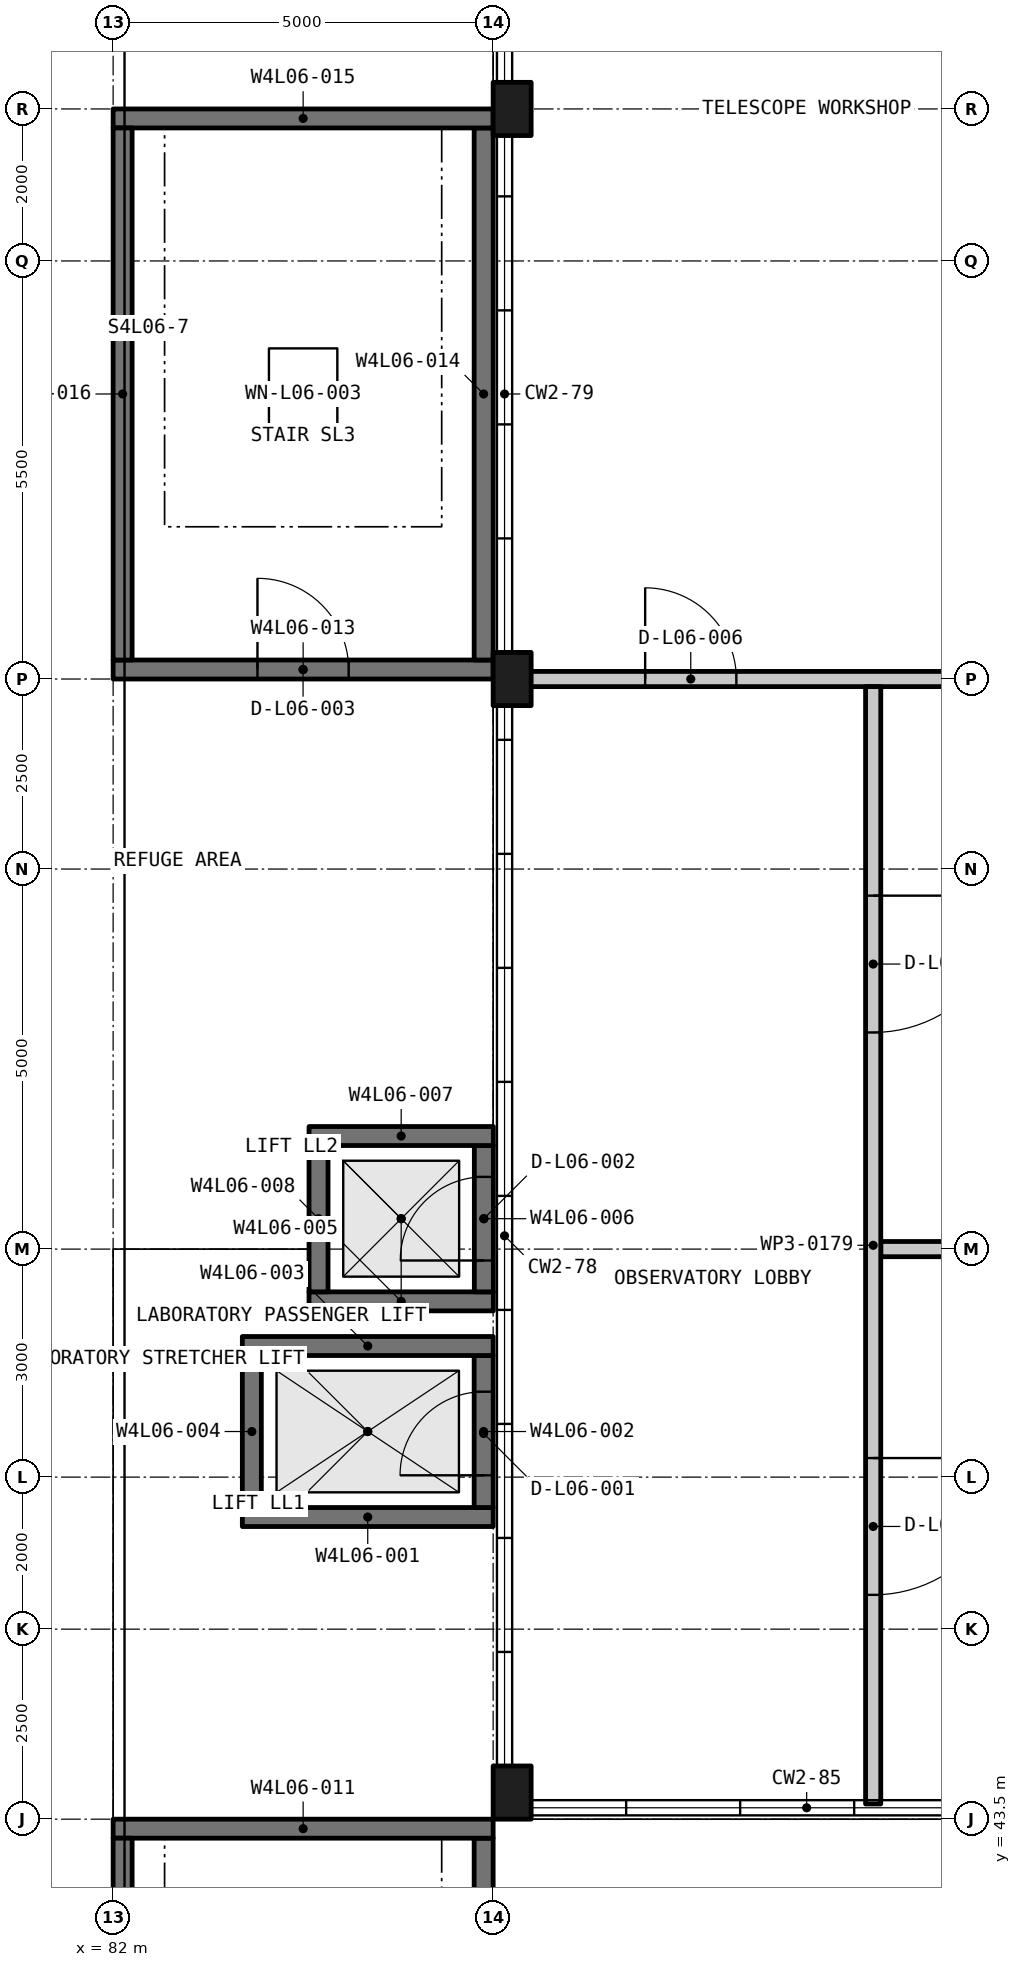
"""IFC4 building model, lengths in metres.
Left out: names, types, materials, properties, quantities, classifications, styles, units other than length and angle.
Written with IfcOpenShell. Run it as: python <this file> out.ifc"""

import sys

from ifc_helpers import new_model, si_unit, direction, frame, frame_2d, origin, origin_2d, place, context, subcontext, project, spatial, rectangle, extrude, element, fill, save


model = new_model("IFC4")
c1 = context("Model", 3, precision=1e-05, world=origin(), true_north=direction((0.0, 1.0)))
c2 = subcontext(c1, "Body", "Model", "MODEL_VIEW")
j1 = project(units=[si_unit("LENGTHUNIT", "METRE"), si_unit("PLANEANGLEUNIT", "RADIAN")], contexts=[c1])
p1 = place(None, origin())
s1 = spatial("IfcSite", under=j1, at=p1, CompositionType="ELEMENT")
p2 = place(p1, origin())
s2 = spatial("IfcBuilding", under=s1, at=p2, CompositionType="ELEMENT")
p3 = place(p2, frame((0.0, 0.0, 29.25)))
s3 = spatial("IfcBuildingStorey", under=s2, at=p3, CompositionType="ELEMENT", Elevation=29.25)
for number, where, z_axis, x_axis in (
    (1, (87.25, 43.85, -0.3), (0.0, 0.0, 1.0), (1.0, 0.0, 0.0)),
    (2, (87.25, 58.5, -0.3), (0.0, 0.0, 1.0), (1.0, 0.0, 0.0)),
    (3, (87.25, 66.0, -0.3), (0.0, 0.0, 1.0), (1.0, 0.0, 0.0)),
):
    element("IfcColumn", number, at=place(p3, frame(where, z_axis=z_axis, x_axis=x_axis)), inside=s3, PredefinedType="COLUMN", context=c2, shape_type="SweptSolid", body=[
        extrude(rectangle(XDim=0.5, YDim=0.7, at=origin_2d()), origin(), (0.0, 0.0, 1.0), 4.5),
    ])
p4 = place(p3, frame((83.7, 47.475, -0.3), z_axis=(0.0, 0.0, 1.0), x_axis=(1.0, 0.0, 0.0)))
e4 = element("IfcWall", 4, at=p4, inside=s3, PredefinedType="SHEAR", context=c2, shape_type="SweptSolid", body=[
    extrude(rectangle(XDim=3.3, YDim=0.25, at=frame_2d((1.65, 0.0))), origin(), (0.0, 0.0, 1.0), 3.65),
])
p5 = place(p3, frame((86.875, 47.6, -0.3), z_axis=(0.0, 0.0, 1.0), x_axis=(0.0, 1.0, 0.0)))
e5 = element("IfcWall", 5, at=p5, inside=s3, PredefinedType="SHEAR", context=c2, shape_type="SweptSolid", body=[
    extrude(rectangle(XDim=2.0, YDim=0.25, at=frame_2d((1.0, 0.0))), origin(), (0.0, 0.0, 1.0), 3.65),
])
p6 = place(p5, frame((0.424, 0.0, 0.3)))
e6 = element("IfcOpeningElement", 6, at=p6, cuts=e5, PredefinedType="OPENING", context=c2, shape_type="SweptSolid", body=[
    extrude(rectangle(XDim=1.1, YDim=2.1, at=frame_2d((0.55, 1.05))), frame((0.0, 0.135, 0.0), z_axis=(0.0, -1.0, 0.0), x_axis=(1.0, 0.0, 0.0)), (0.0, 0.0, 1.0), 0.27),
])
p7 = place(p3, frame((83.7, 49.725, -0.3), z_axis=(0.0, 0.0, 1.0), x_axis=(1.0, 0.0, 0.0)))
e7 = element("IfcWall", 7, at=p7, inside=s3, PredefinedType="SHEAR", context=c2, shape_type="SweptSolid", body=[
    extrude(rectangle(XDim=3.3, YDim=0.25, at=frame_2d((1.65, 0.0))), origin(), (0.0, 0.0, 1.0), 3.65),
])
p8 = place(p3, frame((83.825, 47.6, -0.3), z_axis=(0.0, 0.0, 1.0), x_axis=(0.0, 1.0, 0.0)))
e8 = element("IfcWall", 8, at=p8, inside=s3, PredefinedType="SHEAR", context=c2, shape_type="SweptSolid", body=[
    extrude(rectangle(XDim=2.0, YDim=0.25, at=frame_2d((1.0, 0.0))), origin(), (0.0, 0.0, 1.0), 3.65),
])
p9 = place(p3, frame((84.577, 50.312, -0.3), z_axis=(0.0, 0.0, 1.0), x_axis=(1.0, 0.0, 0.0)))
e9 = element("IfcWall", 9, at=p9, inside=s3, PredefinedType="SHEAR", context=c2, shape_type="SweptSolid", body=[
    extrude(rectangle(XDim=2.425, YDim=0.25, at=frame_2d((1.212, 0.0))), origin(), (0.0, 0.0, 1.0), 4.05),
])
p10 = place(p3, frame((86.877, 50.438, -0.3), z_axis=(0.0, 0.0, 1.0), x_axis=(0.0, 1.0, 0.0)))
e10 = element("IfcWall", 10, at=p10, inside=s3, PredefinedType="SHEAR", context=c2, shape_type="SweptSolid", body=[
    extrude(rectangle(XDim=1.925, YDim=0.25, at=frame_2d((0.962, 0.0))), origin(), (0.0, 0.0, 1.0), 4.05),
])
p11 = place(p10, frame((0.413, 0.0, 0.3)))
e11 = element("IfcOpeningElement", 11, at=p11, cuts=e10, PredefinedType="OPENING", context=c2, shape_type="SweptSolid", body=[
    extrude(rectangle(XDim=1.1, YDim=2.1, at=frame_2d((0.55, 1.05))), frame((0.0, 0.135, 0.0), z_axis=(0.0, -1.0, 0.0), x_axis=(1.0, 0.0, 0.0)), (0.0, 0.0, 1.0), 0.27),
])
p12 = place(p3, frame((84.577, 52.488, -0.3), z_axis=(0.0, 0.0, 1.0), x_axis=(1.0, 0.0, 0.0)))
e12 = element("IfcWall", 12, at=p12, inside=s3, PredefinedType="SHEAR", context=c2, shape_type="SweptSolid", body=[
    extrude(rectangle(XDim=2.425, YDim=0.25, at=frame_2d((1.212, 0.0))), origin(), (0.0, 0.0, 1.0), 4.05),
])
p13 = place(p3, frame((84.702, 50.438, -0.3), z_axis=(0.0, 0.0, 1.0), x_axis=(0.0, 1.0, 0.0)))
e13 = element("IfcWall", 13, at=p13, inside=s3, PredefinedType="SHEAR", context=c2, shape_type="SweptSolid", body=[
    extrude(rectangle(XDim=1.925, YDim=0.25, at=frame_2d((0.962, 0.0))), origin(), (0.0, 0.0, 1.0), 4.05),
])
p14 = place(p3, frame((86.875, 36.25, -0.3), z_axis=(0.0, 0.0, 1.0), x_axis=(0.0, 1.0, 0.0)))
e14 = element("IfcWall", 14, at=p14, inside=s3, PredefinedType="SHEAR", context=c2, shape_type="SweptSolid", body=[
    extrude(rectangle(XDim=7.0, YDim=0.25, at=frame_2d((3.5, 0.0))), origin(), (0.0, 0.0, 1.0), 3.65),
])
p15 = place(p3, frame((82.0, 43.375, -0.3), z_axis=(0.0, 0.0, 1.0), x_axis=(1.0, 0.0, 0.0)))
e15 = element("IfcWall", 15, at=p15, inside=s3, PredefinedType="SHEAR", context=c2, shape_type="SweptSolid", body=[
    extrude(rectangle(XDim=5.0, YDim=0.25, at=frame_2d((2.5, 0.0))), origin(), (0.0, 0.0, 1.0), 3.65),
])
p16 = place(p3, frame((82.125, 36.25, -0.3), z_axis=(0.0, 0.0, 1.0), x_axis=(0.0, 1.0, 0.0)))
e16 = element("IfcWall", 16, at=p16, inside=s3, PredefinedType="SHEAR", context=c2, shape_type="SweptSolid", body=[
    extrude(rectangle(XDim=7.0, YDim=0.25, at=frame_2d((3.5, 0.0))), origin(), (0.0, 0.0, 1.0), 3.65),
])
p17 = place(p3, frame((82.0, 58.625, -0.3), z_axis=(0.0, 0.0, 1.0), x_axis=(1.0, 0.0, 0.0)))
e17 = element("IfcWall", 17, at=p17, inside=s3, PredefinedType="SHEAR", context=c2, shape_type="SweptSolid", body=[
    extrude(rectangle(XDim=5.0, YDim=0.25, at=frame_2d((2.5, 0.0))), origin(), (0.0, 0.0, 1.0), 3.05),
])
p18 = place(p17, frame((1.899, 0.0, 0.3)))
e18 = element("IfcOpeningElement", 18, at=p18, cuts=e17, PredefinedType="OPENING", context=c2, shape_type="SweptSolid", body=[
    extrude(rectangle(XDim=1.2, YDim=2.2, at=frame_2d((0.6, 1.1))), frame((0.0, 0.135, 0.0), z_axis=(0.0, -1.0, 0.0), x_axis=(1.0, 0.0, 0.0)), (0.0, 0.0, 1.0), 0.27),
])
p19 = place(p3, frame((86.875, 58.75, -0.3), z_axis=(0.0, 0.0, 1.0), x_axis=(0.0, 1.0, 0.0)))
e19 = element("IfcWall", 19, at=p19, inside=s3, PredefinedType="SHEAR", context=c2, shape_type="SweptSolid", body=[
    extrude(rectangle(XDim=7.0, YDim=0.25, at=frame_2d((3.5, 0.0))), origin(), (0.0, 0.0, 1.0), 3.05),
])
p20 = place(p3, frame((82.0, 65.875, -0.3), z_axis=(0.0, 0.0, 1.0), x_axis=(1.0, 0.0, 0.0)))
e20 = element("IfcWall", 20, at=p20, inside=s3, PredefinedType="SHEAR", context=c2, shape_type="SweptSolid", body=[
    extrude(rectangle(XDim=5.0, YDim=0.25, at=frame_2d((2.5, 0.0))), origin(), (0.0, 0.0, 1.0), 3.05),
])
p21 = place(p3, frame((82.125, 58.75, -0.3), z_axis=(0.0, 0.0, 1.0), x_axis=(0.0, 1.0, 0.0)))
e21 = element("IfcWall", 21, at=p21, inside=s3, PredefinedType="SHEAR", context=c2, shape_type="SweptSolid", body=[
    extrude(rectangle(XDim=7.0, YDim=0.25, at=frame_2d((3.5, 0.0))), origin(), (0.0, 0.0, 1.0), 3.05),
])
p22 = place(p3, frame((92.1, 51.0, 0.0), z_axis=(0.0, 0.0, 1.0), x_axis=(1.0, 0.0, 0.0)))
e22 = element("IfcWall", 22, at=p22, inside=s3, PredefinedType="PARTITIONING", context=c2, shape_type="SweptSolid", body=[
    extrude(rectangle(XDim=11.7, YDim=0.2, at=frame_2d((5.85, 0.0))), origin(), (0.0, 0.0, 1.0), 3.3),
])
p23 = place(p3, frame((87.2, 58.5, 0.0), z_axis=(0.0, 0.0, 1.0), x_axis=(1.0, 0.0, 0.0)))
e23 = element("IfcWall", 23, at=p23, inside=s3, PredefinedType="PARTITIONING", context=c2, shape_type="SweptSolid", body=[
    extrude(rectangle(XDim=16.6, YDim=0.2, at=frame_2d((8.3, 0.0))), origin(), (0.0, 0.0, 1.0), 3.3),
])
p24 = place(p23, frame((1.8, 0.0, 0.0)))
e24 = element("IfcOpeningElement", 24, at=p24, cuts=e23, PredefinedType="OPENING", context=c2, shape_type="SweptSolid", body=[
    extrude(rectangle(XDim=1.2, YDim=2.1, at=frame_2d((0.6, 1.05))), frame((0.0, 0.11, 0.0), z_axis=(0.0, -1.0, 0.0), x_axis=(1.0, 0.0, 0.0)), (0.0, 0.0, 1.0), 0.22),
])
p25 = place(p23, frame((11.599, 0.0, 0.0)))
e25 = element("IfcOpeningElement", 25, at=p25, cuts=e23, PredefinedType="OPENING", context=c2, shape_type="SweptSolid", body=[
    extrude(rectangle(XDim=1.2, YDim=2.1, at=frame_2d((0.6, 1.05))), frame((0.0, 0.11, 0.0), z_axis=(0.0, -1.0, 0.0), x_axis=(1.0, 0.0, 0.0)), (0.0, 0.0, 1.0), 0.22),
])
p26 = place(p3, frame((92.0, 58.4, 0.0), z_axis=(0.0, 0.0, 1.0), x_axis=(0.0, -1.0, 0.0)))
e26 = element("IfcWall", 26, at=p26, inside=s3, PredefinedType="PARTITIONING", context=c2, shape_type="SweptSolid", body=[
    extrude(rectangle(XDim=14.7, YDim=0.2, at=frame_2d((7.35, 0.0))), origin(), (0.0, 0.0, 1.0), 3.3),
])
p27 = place(p26, frame((10.149, 0.0, 0.0)))
e27 = element("IfcOpeningElement", 27, at=p27, cuts=e26, PredefinedType="OPENING", context=c2, shape_type="SweptSolid", body=[
    extrude(rectangle(XDim=1.8, YDim=2.1, at=frame_2d((0.9, 1.05))), frame((0.0, 0.11, 0.0), z_axis=(0.0, -1.0, 0.0), x_axis=(1.0, 0.0, 0.0)), (0.0, 0.0, 1.0), 0.22),
])
p28 = place(p26, frame((2.75, 0.0, 0.0)))
e28 = element("IfcOpeningElement", 28, at=p28, cuts=e26, PredefinedType="OPENING", context=c2, shape_type="SweptSolid", body=[
    extrude(rectangle(XDim=1.8, YDim=2.1, at=frame_2d((0.9, 1.05))), frame((0.0, 0.11, 0.0), z_axis=(0.0, -1.0, 0.0), x_axis=(1.0, 0.0, 0.0)), (0.0, 0.0, 1.0), 0.22),
])
p29 = place(p3, frame((0.0, 0.0, 2.75)))
p30 = place(p29, frame((84.5, 62.25, -0.01)))
p31 = place(p30, frame((0.0, 0.0, 0.21)))
e29 = element("IfcWindow", 29, at=p31, inside=s3, PartitioningType="SINGLE_PANEL", PredefinedType="SKYLIGHT", context=c2, shape_type="SweptSolid", body=[
    extrude(rectangle(XDim=0.9, YDim=1.2, at=origin_2d()), origin(), (0.0, 0.0, 1.0), 0.05),
])
p32 = place(p6, origin())
e30 = element("IfcDoor", 30, at=p32, inside=s3, OperationType="DOUBLE_DOOR_SLIDING", PredefinedType="DOOR", context=c2, shape_type="SweptSolid", body=[
    extrude(rectangle(XDim=1.1, YDim=2.1, at=frame_2d((0.55, 1.05))), frame((0.0, 0.025, 0.0), z_axis=(0.0, -1.0, 0.0), x_axis=(1.0, 0.0, 0.0)), (0.0, 0.0, 1.0), 0.05),
])
fill(e6, e30)
p33 = place(p11, origin())
e31 = element("IfcDoor", 31, at=p33, inside=s3, OperationType="DOUBLE_DOOR_SLIDING", PredefinedType="DOOR", context=c2, shape_type="SweptSolid", body=[
    extrude(rectangle(XDim=1.1, YDim=2.1, at=frame_2d((0.55, 1.05))), frame((0.0, 0.025, 0.0), z_axis=(0.0, -1.0, 0.0), x_axis=(1.0, 0.0, 0.0)), (0.0, 0.0, 1.0), 0.05),
])
fill(e11, e31)
p34 = place(p18, origin())
e32 = element("IfcDoor", 32, at=p34, inside=s3, OperationType="SINGLE_SWING_RIGHT", PredefinedType="DOOR", context=c2, shape_type="SweptSolid", body=[
    extrude(rectangle(XDim=1.2, YDim=2.2, at=frame_2d((0.6, 1.1))), frame((0.0, 0.025, 0.0), z_axis=(0.0, -1.0, 0.0), x_axis=(1.0, 0.0, 0.0)), (0.0, 0.0, 1.0), 0.05),
])
fill(e18, e32)
p35 = place(p27, origin())
e33 = element("IfcDoor", 33, at=p35, inside=s3, OperationType="DOUBLE_DOOR_SINGLE_SWING", PredefinedType="DOOR", context=c2, shape_type="SweptSolid", body=[
    extrude(rectangle(XDim=1.8, YDim=2.1, at=frame_2d((0.9, 1.05))), frame((0.0, 0.025, 0.0), z_axis=(0.0, -1.0, 0.0), x_axis=(1.0, 0.0, 0.0)), (0.0, 0.0, 1.0), 0.05),
])
fill(e27, e33)
p36 = place(p28, origin())
e34 = element("IfcDoor", 34, at=p36, inside=s3, OperationType="DOUBLE_DOOR_SINGLE_SWING", PredefinedType="DOOR", context=c2, shape_type="SweptSolid", body=[
    extrude(rectangle(XDim=1.8, YDim=2.1, at=frame_2d((0.9, 1.05))), frame((0.0, 0.025, 0.0), z_axis=(0.0, -1.0, 0.0), x_axis=(1.0, 0.0, 0.0)), (0.0, 0.0, 1.0), 0.05),
])
fill(e28, e34)
p37 = place(p24, origin())
e35 = element("IfcDoor", 35, at=p37, inside=s3, OperationType="SINGLE_SWING_RIGHT", PredefinedType="DOOR", context=c2, shape_type="SweptSolid", body=[
    extrude(rectangle(XDim=1.2, YDim=2.1, at=frame_2d((0.6, 1.05))), frame((0.0, 0.025, 0.0), z_axis=(0.0, -1.0, 0.0), x_axis=(1.0, 0.0, 0.0)), (0.0, 0.0, 1.0), 0.05),
])
fill(e24, e35)
save(model, sys.argv[1])
